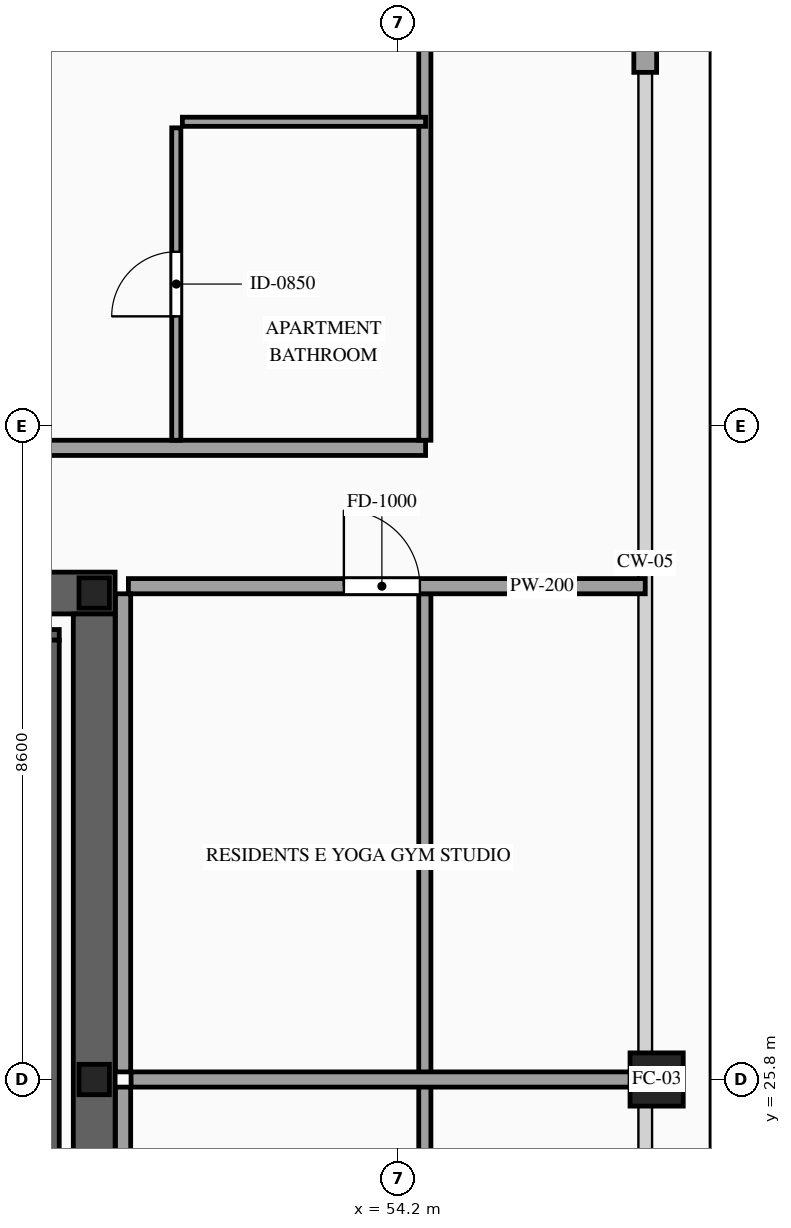
"""IFC4 building model, lengths in metres.
Left out: names, types, materials, properties, quantities, classifications, styles, units other than length and angle.
Written with IfcOpenShell. Run it as: python <this file> out.ifc"""

import sys

from ifc_helpers import new_model, si_unit, direction, frame, frame_2d, origin, origin_2d, place, context, subcontext, project, spatial, rectangle, hollow_rectangle, i_section, extrude, source, transform, mapped, element, fill, save


model = new_model("IFC4")
c1 = context("Model", 3, precision=1e-05, world=origin(), true_north=direction((0.0, 1.0)))
c2 = subcontext(c1, "Body", "Model", "MODEL_VIEW")
j1 = project(units=[si_unit("LENGTHUNIT", "METRE"), si_unit("PLANEANGLEUNIT", "RADIAN")], contexts=[c1])
p1 = place(None, origin())
s1 = spatial("IfcSite", under=j1, at=p1, CompositionType="ELEMENT")
p2 = place(p1, origin())
s2 = spatial("IfcBuilding", under=s1, at=p2, CompositionType="ELEMENT")
p3 = place(p2, frame((0.0, 0.0, 241.6)))
s3 = spatial("IfcBuildingStorey", under=s2, at=p3, CompositionType="ELEMENT", Elevation=241.6)
p4 = place(p3, frame((23.525, 32.2, 0.0), z_axis=(0.0, 0.0, 1.0), x_axis=(1.0, 0.0, 0.0)))
e1 = element("IfcWall", 1, at=p4, inside=s3, PredefinedType="SHEAR", context=c2, shape_type="SweptSolid", body=[
    extrude(rectangle(XDim=26.95, YDim=0.55, at=frame_2d((13.475, 0.0))), origin(), (0.0, 0.0, 1.0), 3.5),
])
p5 = place(p4, frame((4.545, 0.0, 0.0)))
e2 = element("IfcOpeningElement", 2, at=p5, cuts=e1, PredefinedType="OPENING", context=c2, shape_type="SweptSolid", body=[
    extrude(rectangle(XDim=0.9, YDim=2.15, at=frame_2d((0.45, 1.075))), frame((0.0, 0.29, 0.0), z_axis=(0.0, -1.0, 0.0), x_axis=(1.0, 0.0, 0.0)), (0.0, 0.0, 1.0), 0.58),
])
p6 = place(p4, frame((9.825, 0.0, 0.0)))
e3 = element("IfcOpeningElement", 3, at=p6, cuts=e1, PredefinedType="OPENING", context=c2, shape_type="SweptSolid", body=[
    extrude(rectangle(XDim=1.1, YDim=2.2, at=frame_2d((0.55, 1.1))), frame((0.0, 0.29, 0.0), z_axis=(0.0, -1.0, 0.0), x_axis=(1.0, 0.0, 0.0)), (0.0, 0.0, 1.0), 0.58),
])
p7 = place(p4, frame((15.675, 0.0, 0.0)))
e4 = element("IfcOpeningElement", 4, at=p7, cuts=e1, PredefinedType="OPENING", context=c2, shape_type="SweptSolid", body=[
    extrude(rectangle(XDim=1.1, YDim=2.2, at=frame_2d((0.55, 1.1))), frame((0.0, 0.29, 0.0), z_axis=(0.0, -1.0, 0.0), x_axis=(1.0, 0.0, 0.0)), (0.0, 0.0, 1.0), 0.58),
])
p8 = place(p4, frame((18.205, 0.0, 0.0)))
e5 = element("IfcOpeningElement", 5, at=p8, cuts=e1, PredefinedType="OPENING", context=c2, shape_type="SweptSolid", body=[
    extrude(rectangle(XDim=0.9, YDim=2.15, at=frame_2d((0.45, 1.075))), frame((0.0, 0.29, 0.0), z_axis=(0.0, -1.0, 0.0), x_axis=(1.0, 0.0, 0.0)), (0.0, 0.0, 1.0), 0.58),
])
p9 = place(p4, frame((19.645, 0.0, 0.0)))
e6 = element("IfcOpeningElement", 6, at=p9, cuts=e1, PredefinedType="OPENING", context=c2, shape_type="SweptSolid", body=[
    extrude(rectangle(XDim=0.9, YDim=2.15, at=frame_2d((0.45, 1.075))), frame((0.0, 0.29, 0.0), z_axis=(0.0, -1.0, 0.0), x_axis=(1.0, 0.0, 0.0)), (0.0, 0.0, 1.0), 0.58),
])
m1 = source(origin(), c2, "Body", "SweptSolid", [
    extrude(rectangle(XDim=12.25, YDim=0.55, at=frame_2d((6.125, 0.0))), origin(), (0.0, 0.0, 1.0), 3.5),
])
p10 = place(p3, frame((50.2, 19.675, 0.0), z_axis=(0.0, 0.0, 1.0), x_axis=(0.0, 1.0, 0.0)))
e7 = element("IfcWall", 7, at=p10, inside=s3, PredefinedType="SHEAR", context=c2, shape_type="MappedRepresentation", body=[
    mapped(m1, transform((0.0, 0.0, 0.0), scale=1.0)),
])
m2 = source(origin(), c2, "Body", "SweptSolid", [
    extrude(i_section(OverallWidth=0.4, OverallDepth=0.4, WebThickness=0.013, FlangeThickness=0.021, at=origin_2d()), origin(), (0.0, 0.0, 1.0), 3.5),
])
for number, where, z_axis, x_axis in (
    (8, (50.2, 25.8, 0.0), (0.0, 0.0, 1.0), (1.0, 0.0, 0.0)),
    (9, (50.2, 32.2, 0.0), (0.0, 0.0, 1.0), (1.0, 0.0, 0.0)),
):
    element("IfcColumn", number, at=place(p3, frame(where, z_axis=z_axis, x_axis=x_axis)), inside=s3, PredefinedType="COLUMN", context=c2, shape_type="MappedRepresentation", body=[
        mapped(m2, transform((0.0, 0.0, 0.0), scale=1.0)),
    ])
m3 = source(origin(), c2, "Body", "SweptSolid", [
    extrude(hollow_rectangle(XDim=0.7, YDim=0.7, WallThickness=0.032, at=origin_2d()), origin(), (0.0, 0.0, 1.0), 3.5),
])
p11 = place(p3, frame((57.6, 25.8, 0.0), z_axis=(0.0, 0.0, 1.0), x_axis=(1.0, 0.0, 0.0)))
e10 = element("IfcColumn", 10, at=p11, inside=s3, PredefinedType="COLUMN", context=c2, shape_type="MappedRepresentation", body=[
    mapped(m3, transform((0.0, 0.0, 0.0), scale=1.0)),
])
m4 = source(origin(), c2, "Body", "SweptSolid", [
    extrude(rectangle(XDim=3.15, YDim=0.3, at=frame_2d((1.575, 0.0))), origin(), (0.0, 0.0, 1.0), 2.835),
])
p12 = place(p3, frame((57.45, 39.05, 0.0), z_axis=(0.0, 0.0, 1.0), x_axis=(0.0, 1.0, 0.0)))
e11 = element("IfcWall", 11, at=p12, inside=s3, PredefinedType="SOLIDWALL", context=c2, shape_type="MappedRepresentation", body=[
    mapped(m4, transform((0.0, 0.0, 0.0), scale=1.0)),
])
m5 = source(origin(), c2, "Body", "SweptSolid", [
    extrude(rectangle(XDim=3.28, YDim=0.14, at=frame_2d((1.64, 0.0))), origin(), (0.0, 0.0, 1.0), 3.28),
])
p13 = place(p3, frame((46.46, 31.65, 0.0), z_axis=(0.0, 0.0, 1.0), x_axis=(1.0, 0.0, 0.0)))
e12 = element("IfcWall", 12, at=p13, inside=s3, PredefinedType="SOLIDWALL", context=c2, shape_type="MappedRepresentation", body=[
    mapped(m5, transform((0.0, 0.0, 0.0), scale=1.0)),
])
m6 = source(origin(), c2, "Body", "SweptSolid", [
    extrude(rectangle(XDim=8.94, YDim=0.14, at=frame_2d((4.47, 0.0))), origin(), (0.0, 0.0, 1.0), 3.28),
])
p14 = place(p3, frame((49.67, 22.64, 0.0), z_axis=(0.0, 0.0, 1.0), x_axis=(0.0, 1.0, 0.0)))
e13 = element("IfcWall", 13, at=p14, inside=s3, PredefinedType="SOLIDWALL", context=c2, shape_type="MappedRepresentation", body=[
    mapped(m6, transform((0.0, 0.0, 0.0), scale=1.0)),
])
p15 = place(p3, frame((43.05, 34.11, 0.0), z_axis=(0.0, 0.0, 1.0), x_axis=(1.0, 0.0, 0.0)))
e14 = element("IfcWall", 14, at=p15, inside=s3, PredefinedType="PARTITIONING", context=c2, shape_type="SweptSolid", body=[
    extrude(rectangle(XDim=11.51, YDim=0.2, at=frame_2d((5.755, 0.0))), origin(), (0.0, 0.0, 1.0), 3.28),
])
p16 = place(p15, frame((5.355, 0.0, 0.0)))
e15 = element("IfcOpeningElement", 15, at=p16, cuts=e14, PredefinedType="OPENING", context=c2, shape_type="SweptSolid", body=[
    extrude(rectangle(XDim=1.0, YDim=2.2, at=frame_2d((0.5, 1.1))), frame((0.0, 0.115, 0.0), z_axis=(0.0, -1.0, 0.0), x_axis=(1.0, 0.0, 0.0)), (0.0, 0.0, 1.0), 0.23),
])
m7 = source(origin(), c2, "Body", "SweptSolid", [
    extrude(rectangle(XDim=11.89, YDim=0.16, at=frame_2d((5.945, 0.0))), origin(), (0.0, 0.0, 1.0), 3.28),
])
p17 = place(p3, frame((54.55, 34.21, 0.0), z_axis=(0.0, 0.0, 1.0), x_axis=(0.0, 1.0, 0.0)))
e16 = element("IfcWall", 16, at=p17, inside=s3, PredefinedType="PARTITIONING", context=c2, shape_type="MappedRepresentation", body=[
    mapped(m7, transform((0.0, 0.0, 0.0), scale=1.0)),
])
m8 = source(origin(), c2, "Body", "SweptSolid", [
    extrude(rectangle(XDim=3.2, YDim=0.12, at=frame_2d((1.6, 0.0))), origin(), (0.0, 0.0, 1.0), 3.28),
])
p18 = place(p3, frame((51.36, 38.4, 0.0), z_axis=(0.0, 0.0, 1.0), x_axis=(1.0, 0.0, 0.0)))
e17 = element("IfcWall", 17, at=p18, inside=s3, PredefinedType="PARTITIONING", context=c2, shape_type="MappedRepresentation", body=[
    mapped(m8, transform((0.0, 0.0, 0.0), scale=1.0)),
])
p19 = place(p3, frame((51.28, 34.21, 0.0), z_axis=(0.0, 0.0, 1.0), x_axis=(0.0, 1.0, 0.0)))
e18 = element("IfcWall", 18, at=p19, inside=s3, PredefinedType="PARTITIONING", context=c2, shape_type="SweptSolid", body=[
    extrude(rectangle(XDim=4.11, YDim=0.12, at=frame_2d((2.055, 0.0))), origin(), (0.0, 0.0, 1.0), 3.28),
])
p20 = place(p19, frame((1.63, 0.0, 0.0)))
e19 = element("IfcOpeningElement", 19, at=p20, cuts=e18, PredefinedType="OPENING", context=c2, shape_type="SweptSolid", body=[
    extrude(rectangle(XDim=0.85, YDim=2.1, at=frame_2d((0.425, 1.05))), frame((0.0, 0.075, 0.0), z_axis=(0.0, -1.0, 0.0), x_axis=(1.0, 0.0, 0.0)), (0.0, 0.0, 1.0), 0.15),
])
m9 = source(origin(), c2, "Body", "SweptSolid", [
    extrude(rectangle(XDim=26.69, YDim=0.16, at=frame_2d((13.345, 0.0))), origin(), (0.0, 0.0, 1.0), 3.28),
])
p21 = place(p3, frame((54.55, 5.5, 0.0), z_axis=(0.0, 0.0, 1.0), x_axis=(0.0, 1.0, 0.0)))
e20 = element("IfcWall", 20, at=p21, inside=s3, PredefinedType="PARTITIONING", context=c2, shape_type="MappedRepresentation", body=[
    mapped(m9, transform((0.0, 0.0, 0.0), scale=1.0)),
])
m10 = source(origin(), c2, "Body", "SweptSolid", [
    extrude(rectangle(XDim=6.765, YDim=0.2, at=frame_2d((3.382, 0.0))), origin(), (0.0, 0.0, 1.0), 2.787),
])
p22 = place(p3, frame((50.685, 25.8, 0.0), z_axis=(0.0, 0.0, 1.0), x_axis=(1.0, 0.0, 0.0)))
e21 = element("IfcWall", 21, at=p22, inside=s3, PredefinedType="PARTITIONING", context=c2, shape_type="MappedRepresentation", body=[
    mapped(m10, transform((0.0, 0.0, 0.0), scale=1.0)),
])
m11 = source(origin(), c2, "Body", "SweptSolid", [
    extrude(rectangle(XDim=6.29, YDim=0.2, at=frame_2d((3.145, 0.0))), origin(), (0.0, 0.0, 1.0), 3.28),
])
p23 = place(p3, frame((50.58, 19.41, 0.0), z_axis=(0.0, 0.0, 1.0), x_axis=(0.0, 1.0, 0.0)))
e22 = element("IfcWall", 22, at=p23, inside=s3, PredefinedType="PARTITIONING", context=c2, shape_type="MappedRepresentation", body=[
    mapped(m11, transform((0.0, 0.0, 0.0), scale=1.0)),
])
p24 = place(p3, frame((50.65, 32.29, 0.0), z_axis=(0.0, 0.0, 1.0), x_axis=(1.0, 0.0, 0.0)))
e23 = element("IfcWall", 23, at=p24, inside=s3, PredefinedType="PARTITIONING", context=c2, shape_type="SweptSolid", body=[
    extrude(rectangle(XDim=6.8, YDim=0.2, at=frame_2d((3.4, 0.0))), origin(), (0.0, 0.0, 1.0), 2.825),
])
p25 = place(p24, frame((2.835, 0.0, 0.0)))
e24 = element("IfcOpeningElement", 24, at=p25, cuts=e23, PredefinedType="OPENING", context=c2, shape_type="SweptSolid", body=[
    extrude(rectangle(XDim=1.0, YDim=2.2, at=frame_2d((0.5, 1.1))), frame((0.0, 0.115, 0.0), z_axis=(0.0, -1.0, 0.0), x_axis=(1.0, 0.0, 0.0)), (0.0, 0.0, 1.0), 0.23),
])
p26 = place(p3, frame((50.58, 25.9, 0.0), z_axis=(0.0, 0.0, 1.0), x_axis=(0.0, 1.0, 0.0)))
e25 = element("IfcWall", 25, at=p26, inside=s3, PredefinedType="PARTITIONING", context=c2, shape_type="MappedRepresentation", body=[
    mapped(m11, transform((0.0, 0.0, 0.0), scale=1.0)),
])
m12 = source(origin(), c2, "Body", "SweptSolid", [
    extrude(rectangle(XDim=0.85, YDim=2.1, at=frame_2d((0.425, 1.05))), frame((0.0, 0.025, 0.0), z_axis=(0.0, -1.0, 0.0), x_axis=(1.0, 0.0, 0.0)), (0.0, 0.0, 1.0), 0.05),
])
p27 = place(p20, origin())
e26 = element("IfcDoor", 26, at=p27, inside=s3, OperationType="SINGLE_SWING_LEFT", PredefinedType="DOOR", context=c2, shape_type="MappedRepresentation", body=[
    mapped(m12, transform((0.0, 0.0, 0.0), scale=1.0)),
])
fill(e19, e26)
m13 = source(origin(), c2, "Body", "SweptSolid", [
    extrude(rectangle(XDim=1.0, YDim=2.2, at=frame_2d((0.5, 1.1))), frame((0.0, 0.025, 0.0), z_axis=(0.0, -1.0, 0.0), x_axis=(1.0, 0.0, 0.0)), (0.0, 0.0, 1.0), 0.05),
])
p28 = place(p25, origin())
e27 = element("IfcDoor", 27, at=p28, inside=s3, OperationType="SINGLE_SWING_LEFT", PredefinedType="DOOR", context=c2, shape_type="MappedRepresentation", body=[
    mapped(m13, transform((0.0, 0.0, 0.0), scale=1.0)),
])
fill(e24, e27)
save(model, sys.argv[1])
